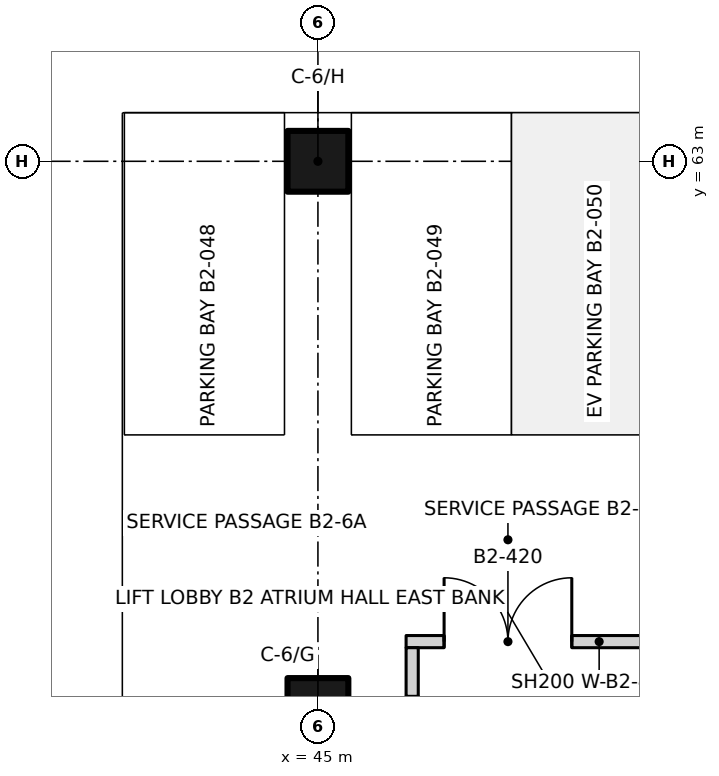
"""IFC4 building model, lengths in metres.
Left out: names, types, materials, properties, quantities, classifications, styles, units other than length and angle.
Written with IfcOpenShell. Run it as: python <this file> out.ifc"""

import sys

from ifc_helpers import new_model, si_unit, direction, frame, frame_2d, origin, origin_2d, place, context, subcontext, project, spatial, rectangle, extrude, element, fill, save


model = new_model("IFC4")
c1 = context("Model", 3, precision=1e-05, world=origin(), true_north=direction((0.0, 1.0)))
c2 = subcontext(c1, "Body", "Model", "MODEL_VIEW")
j1 = project(units=[si_unit("LENGTHUNIT", "METRE"), si_unit("PLANEANGLEUNIT", "RADIAN")], contexts=[c1])
p1 = place(None, origin())
s1 = spatial("IfcSite", under=j1, at=p1, CompositionType="ELEMENT")
p2 = place(p1, origin())
s2 = spatial("IfcBuilding", under=s1, at=p2, CompositionType="ELEMENT")
p3 = place(p2, frame((0.0, 0.0, -9.9)))
s3 = spatial("IfcBuildingStorey", under=s2, at=p3, CompositionType="ELEMENT", Elevation=-9.9)
for number, where, z_axis, x_axis in (
    (1, (45.0, 54.0, 0.0), (0.0, 0.0, 1.0), (1.0, 0.0, 0.0)),
    (2, (45.0, 63.0, 0.0), (0.0, 0.0, 1.0), (1.0, 0.0, 0.0)),
):
    element("IfcColumn", number, at=place(p3, frame(where, z_axis=z_axis, x_axis=x_axis)), inside=s3, PredefinedType="COLUMN", context=c2, shape_type="SweptSolid", body=[
        extrude(rectangle(XDim=1.0, YDim=1.0, at=origin_2d()), origin(), (0.0, 0.0, 1.0), 4.8),
    ])
p4 = place(p3, frame((46.45, 55.1, 0.0), z_axis=(0.0, 0.0, 1.0), x_axis=(1.0, 0.0, 0.0)))
e3 = element("IfcWall", 3, at=p4, inside=s3, PredefinedType="PARTITIONING", context=c2, shape_type="SweptSolid", body=[
    extrude(rectangle(XDim=6.35, YDim=0.2, at=frame_2d((3.175, 0.0))), origin(), (0.0, 0.0, 1.0), 4.5),
])
p5 = place(p4, frame((0.625, 0.0, 0.0)))
e4 = element("IfcOpeningElement", 4, at=p5, cuts=e3, PredefinedType="OPENING", context=c2, shape_type="SweptSolid", body=[
    extrude(rectangle(XDim=2.1, YDim=2.4, at=frame_2d((1.05, 1.2))), frame((0.0, 0.11, 0.0), z_axis=(0.0, -1.0, 0.0), x_axis=(1.0, 0.0, 0.0)), (0.0, 0.0, 1.0), 0.22),
])
p6 = place(p3, frame((46.55, 54.2, 0.0), z_axis=(0.0, 0.0, 1.0), x_axis=(0.0, 1.0, 0.0)))
e5 = element("IfcWall", 5, at=p6, inside=s3, PredefinedType="PARTITIONING", context=c2, shape_type="SweptSolid", body=[
    extrude(rectangle(XDim=0.8, YDim=0.2, at=frame_2d((0.4, 0.0))), origin(), (0.0, 0.0, 1.0), 4.5),
])
p7 = place(p5, origin())
e6 = element("IfcDoor", 6, at=p7, inside=s3, OperationType="DOUBLE_DOOR_SINGLE_SWING", PredefinedType="DOOR", context=c2, shape_type="SweptSolid", body=[
    extrude(rectangle(XDim=2.1, YDim=2.4, at=frame_2d((1.05, 1.2))), frame((0.0, 0.025, 0.0), z_axis=(0.0, -1.0, 0.0), x_axis=(1.0, 0.0, 0.0)), (0.0, 0.0, 1.0), 0.05),
])
fill(e4, e6)
save(model, sys.argv[1])
